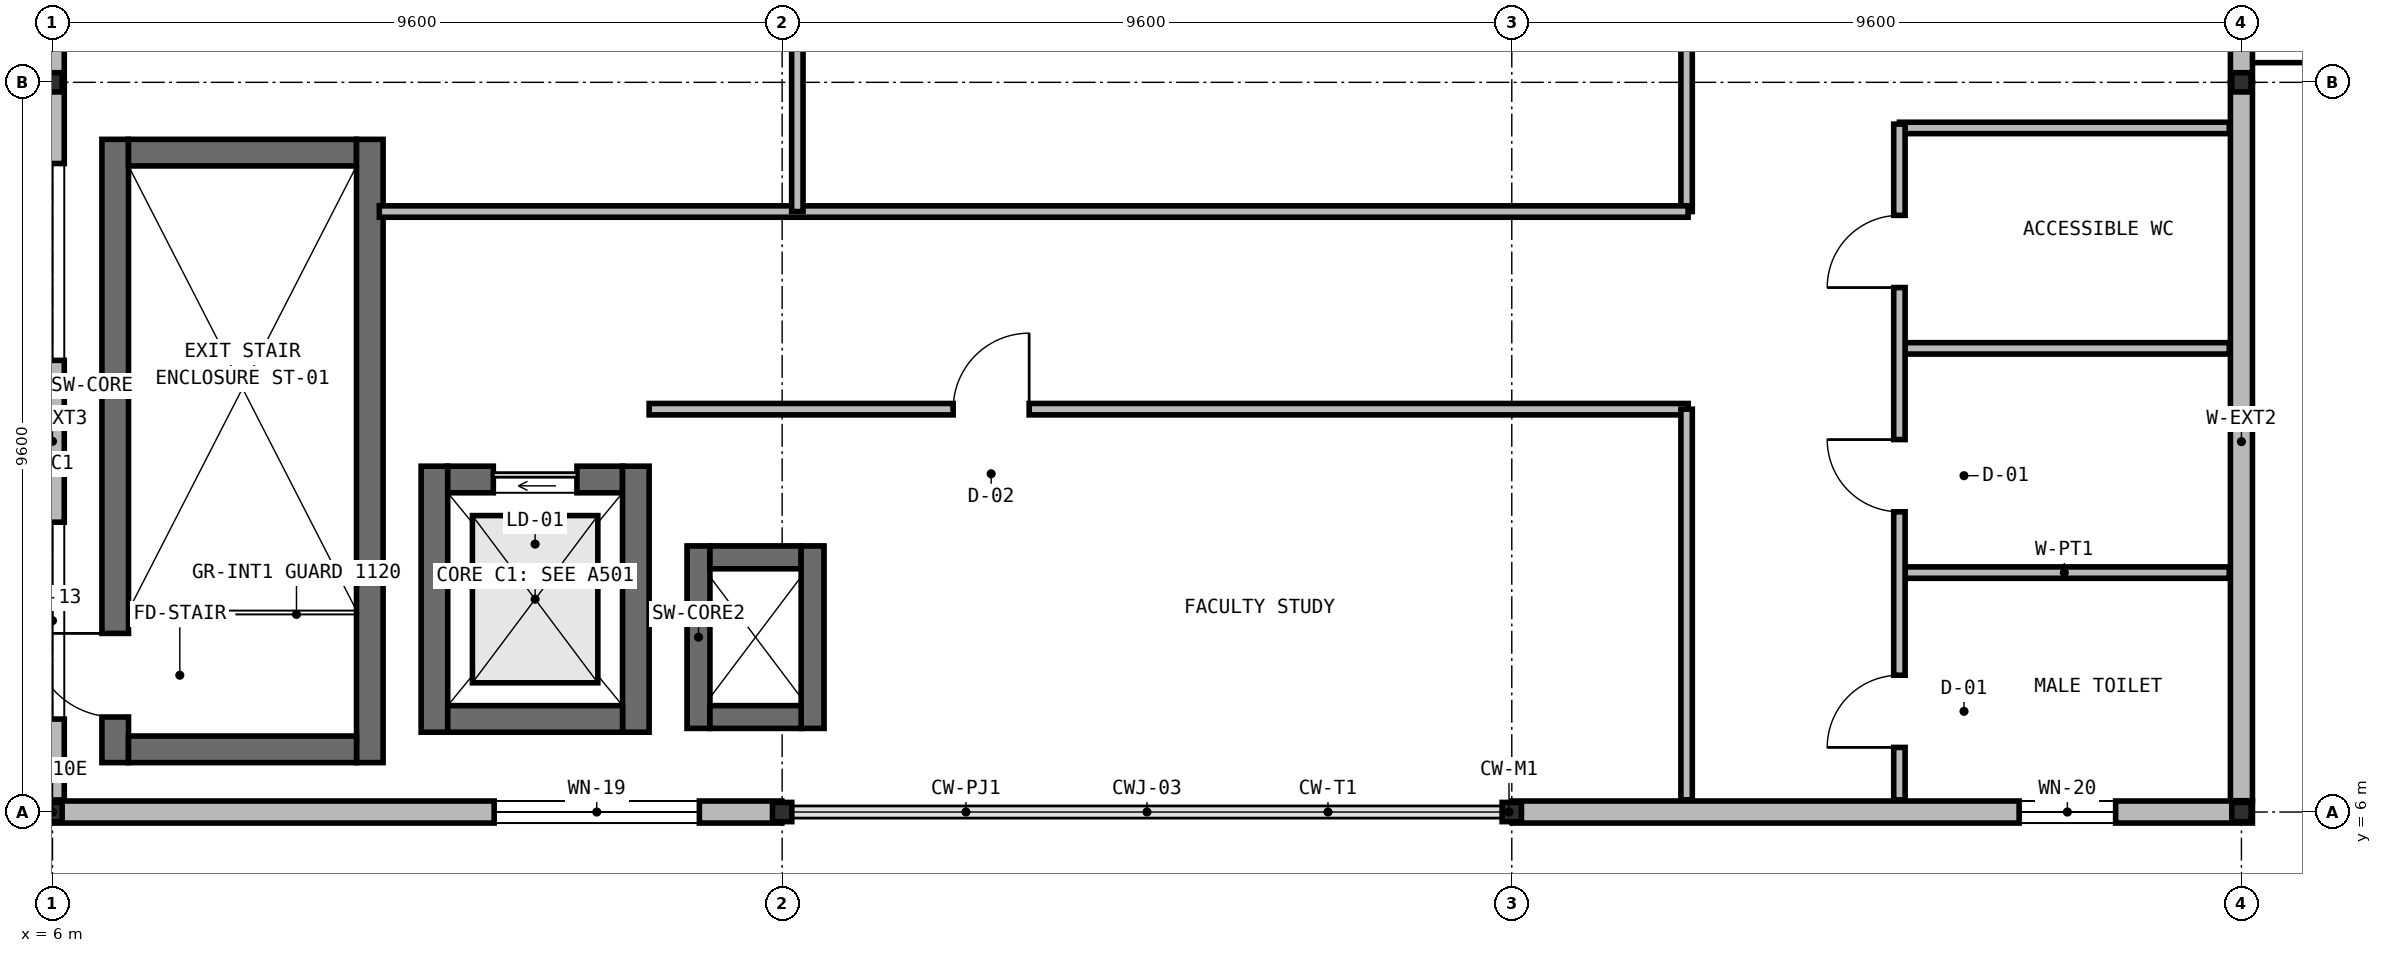
"""IFC4 building model, lengths in metres.
Left out: names, types, materials, properties, quantities, classifications, styles, units other than length and angle.
Written with IfcOpenShell. Run it as: python <this file> out.ifc"""

import sys

from ifc_helpers import new_model, si_unit, direction, frame, frame_2d, origin, origin_2d, place, context, subcontext, project, spatial, rectangle, i_section, extrude, element, fill, save


model = new_model("IFC4")
c1 = context("Model", 3, precision=1e-05, world=origin(), true_north=direction((0.0, 1.0)))
c2 = subcontext(c1, "Body", "Model", "MODEL_VIEW")
j1 = project(units=[si_unit("LENGTHUNIT", "METRE"), si_unit("PLANEANGLEUNIT", "RADIAN")], contexts=[c1])
p1 = place(None, origin())
s1 = spatial("IfcSite", under=j1, at=p1, CompositionType="ELEMENT")
p2 = place(p1, origin())
s2 = spatial("IfcBuilding", under=s1, at=p2, CompositionType="ELEMENT")
p3 = place(p2, frame((0.0, 0.0, 9.8)))
s3 = spatial("IfcBuildingStorey", under=s2, at=p3, CompositionType="ELEMENT", Elevation=9.8)
p4 = place(p3, frame((6.825, 6.65, 0.0), z_axis=(0.0, 0.0, 1.0), x_axis=(0.0, 1.0, 0.0)))
e1 = element("IfcWall", 1, at=p4, inside=s3, PredefinedType="SHEAR", context=c2, shape_type="SweptSolid", body=[
    extrude(rectangle(XDim=8.2, YDim=0.35, at=frame_2d((4.1, 0.0))), origin(), (0.0, 0.0, 1.0), 4.35),
])
p5 = place(p4, frame((0.6, 0.0, 0.0)))
e2 = element("IfcOpeningElement", 2, at=p5, cuts=e1, PredefinedType="OPENING", context=c2, shape_type="SweptSolid", body=[
    extrude(rectangle(XDim=1.1, YDim=2.15, at=frame_2d((0.55, 1.075))), frame((0.0, 0.185, 0.0), z_axis=(0.0, -1.0, 0.0), x_axis=(1.0, 0.0, 0.0)), (0.0, 0.0, 1.0), 0.37),
])
p6 = place(p3, frame((7.0, 14.675, 0.0), z_axis=(0.0, 0.0, 1.0), x_axis=(1.0, 0.0, 0.0)))
e3 = element("IfcWall", 3, at=p6, inside=s3, PredefinedType="SHEAR", context=c2, shape_type="SweptSolid", body=[
    extrude(rectangle(XDim=3.0, YDim=0.35, at=frame_2d((1.5, 0.0))), origin(), (0.0, 0.0, 1.0), 4.35),
])
p7 = place(p3, frame((10.175, 14.85, 0.0), z_axis=(0.0, 0.0, 1.0), x_axis=(0.0, -1.0, 0.0)))
e4 = element("IfcWall", 4, at=p7, inside=s3, PredefinedType="SHEAR", context=c2, shape_type="SweptSolid", body=[
    extrude(rectangle(XDim=8.2, YDim=0.35, at=frame_2d((4.1, 0.0))), origin(), (0.0, 0.0, 1.0), 4.35),
])
p8 = place(p3, frame((10.0, 6.825, 0.0), z_axis=(0.0, 0.0, 1.0), x_axis=(-1.0, 0.0, 0.0)))
e5 = element("IfcWall", 5, at=p8, inside=s3, PredefinedType="SHEAR", context=c2, shape_type="SweptSolid", body=[
    extrude(rectangle(XDim=3.0, YDim=0.35, at=frame_2d((1.5, 0.0))), origin(), (0.0, 0.0, 1.0), 4.35),
])
p9 = place(p3, frame((11.025, 7.05, 0.0), z_axis=(0.0, 0.0, 1.0), x_axis=(0.0, 1.0, 0.0)))
e6 = element("IfcWall", 6, at=p9, inside=s3, PredefinedType="SHEAR", context=c2, shape_type="SweptSolid", body=[
    extrude(rectangle(XDim=3.5, YDim=0.35, at=frame_2d((1.75, 0.0))), origin(), (0.0, 0.0, 1.0), 4.55),
])
p10 = place(p3, frame((11.2, 10.375, 0.0), z_axis=(0.0, 0.0, 1.0), x_axis=(1.0, 0.0, 0.0)))
e7 = element("IfcWall", 7, at=p10, inside=s3, PredefinedType="SHEAR", context=c2, shape_type="SweptSolid", body=[
    extrude(rectangle(XDim=2.3, YDim=0.35, at=frame_2d((1.15, 0.0))), origin(), (0.0, 0.0, 1.0), 4.55),
])
p11 = place(p10, frame((0.6, 0.0, 0.0)))
e8 = element("IfcOpeningElement", 8, at=p11, cuts=e7, PredefinedType="OPENING", context=c2, shape_type="SweptSolid", body=[
    extrude(rectangle(XDim=1.1, YDim=2.15, at=frame_2d((0.55, 1.075))), frame((0.0, 0.185, 0.0), z_axis=(0.0, -1.0, 0.0), x_axis=(1.0, 0.0, 0.0)), (0.0, 0.0, 1.0), 0.37),
])
p12 = place(p3, frame((13.675, 10.55, 0.0), z_axis=(0.0, 0.0, 1.0), x_axis=(0.0, -1.0, 0.0)))
e9 = element("IfcWall", 9, at=p12, inside=s3, PredefinedType="SHEAR", context=c2, shape_type="SweptSolid", body=[
    extrude(rectangle(XDim=3.5, YDim=0.35, at=frame_2d((1.75, 0.0))), origin(), (0.0, 0.0, 1.0), 4.55),
])
p13 = place(p3, frame((13.5, 7.225, 0.0), z_axis=(0.0, 0.0, 1.0), x_axis=(-1.0, 0.0, 0.0)))
e10 = element("IfcWall", 10, at=p13, inside=s3, PredefinedType="SHEAR", context=c2, shape_type="SweptSolid", body=[
    extrude(rectangle(XDim=2.3, YDim=0.35, at=frame_2d((1.15, 0.0))), origin(), (0.0, 0.0, 1.0), 4.55),
])
for number, where, z_axis, x_axis in (
    (11, (6.0, 6.0, 0.0), (0.0, 0.0, 1.0), (1.0, 0.0, 0.0)),
    (12, (6.0, 15.6, 0.0), (0.0, 0.0, 1.0), (1.0, 0.0, 0.0)),
    (13, (15.6, 6.0, 0.0), (0.0, 0.0, 1.0), (1.0, 0.0, 0.0)),
    (14, (25.2, 6.0, 0.0), (0.0, 0.0, 1.0), (1.0, 0.0, 0.0)),
    (15, (34.8, 6.0, 0.0), (0.0, 0.0, 1.0), (1.0, 0.0, 0.0)),
    (16, (34.8, 15.6, 0.0), (0.0, 0.0, 1.0), (1.0, 0.0, 0.0)),
):
    element("IfcColumn", number, at=place(p3, frame(where, z_axis=z_axis, x_axis=x_axis)), inside=s3, PredefinedType="COLUMN", context=c2, shape_type="SweptSolid", body=[
        extrude(i_section(OverallWidth=0.254, OverallDepth=0.253, WebThickness=0.009, FlangeThickness=0.014, at=origin_2d()), origin(), (0.0, 0.0, 1.0), 4.55),
    ])
p14 = place(p3, frame((14.5, 7.1, 0.0), z_axis=(0.0, 0.0, 1.0), x_axis=(0.0, 1.0, 0.0)))
e17 = element("IfcWall", 17, at=p14, inside=s3, PredefinedType="SHEAR", context=c2, shape_type="SweptSolid", body=[
    extrude(rectangle(XDim=2.4, YDim=0.3, at=frame_2d((1.2, 0.0))), origin(), (0.0, 0.0, 1.0), 4.37),
])
p15 = place(p3, frame((14.65, 9.35, 0.0), z_axis=(0.0, 0.0, 1.0), x_axis=(1.0, 0.0, 0.0)))
e18 = element("IfcWall", 18, at=p15, inside=s3, PredefinedType="SHEAR", context=c2, shape_type="SweptSolid", body=[
    extrude(rectangle(XDim=1.2, YDim=0.3, at=frame_2d((0.6, 0.0))), origin(), (0.0, 0.0, 1.0), 4.37),
])
p16 = place(p3, frame((16.0, 9.5, 0.0), z_axis=(0.0, 0.0, 1.0), x_axis=(0.0, -1.0, 0.0)))
e19 = element("IfcWall", 19, at=p16, inside=s3, PredefinedType="SHEAR", context=c2, shape_type="SweptSolid", body=[
    extrude(rectangle(XDim=2.4, YDim=0.3, at=frame_2d((1.2, 0.0))), origin(), (0.0, 0.0, 1.0), 4.37),
])
p17 = place(p3, frame((15.85, 7.25, 0.0), z_axis=(0.0, 0.0, 1.0), x_axis=(-1.0, 0.0, 0.0)))
e20 = element("IfcWall", 20, at=p17, inside=s3, PredefinedType="SHEAR", context=c2, shape_type="SweptSolid", body=[
    extrude(rectangle(XDim=1.2, YDim=0.3, at=frame_2d((0.6, 0.0))), origin(), (0.0, 0.0, 1.0), 4.37),
])
p18 = place(p3, frame((6.0, 6.159, 0.0), z_axis=(0.0, 0.0, 1.0), x_axis=(0.0, 1.0, 0.0)))
e21 = element("IfcWall", 21, at=p18, inside=s3, PredefinedType="SOLIDWALL", context=c2, shape_type="SweptSolid", body=[
    extrude(rectangle(XDim=9.437, YDim=0.31, at=frame_2d((4.719, 0.0))), origin(), (0.0, 0.0, 1.0), 4.064),
])
p19 = place(p18, frame((1.064, 0.0, 0.95)))
e22 = element("IfcOpeningElement", 22, at=p19, cuts=e21, PredefinedType="OPENING", context=c2, shape_type="SweptSolid", body=[
    extrude(rectangle(XDim=2.59, YDim=1.8, at=frame_2d((1.295, 0.9))), frame((0.0, 0.165, 0.0), z_axis=(0.0, -1.0, 0.0), x_axis=(1.0, 0.0, 0.0)), (0.0, 0.0, 1.0), 0.33),
])
p20 = place(p18, frame((5.783, 0.0, 0.95)))
e23 = element("IfcOpeningElement", 23, at=p20, cuts=e21, PredefinedType="OPENING", context=c2, shape_type="SweptSolid", body=[
    extrude(rectangle(XDim=2.59, YDim=1.8, at=frame_2d((1.295, 0.9))), frame((0.0, 0.165, 0.0), z_axis=(0.0, -1.0, 0.0), x_axis=(1.0, 0.0, 0.0)), (0.0, 0.0, 1.0), 0.33),
])
p21 = place(p3, frame((6.0, 15.604, 0.0), z_axis=(0.0, 0.0, 1.0), x_axis=(0.0, 1.0, 0.0)))
e24 = element("IfcWall", 24, at=p21, inside=s3, PredefinedType="SOLIDWALL", context=c2, shape_type="SweptSolid", body=[
    extrude(rectangle(XDim=9.592, YDim=0.31, at=frame_2d((4.796, 0.0))), origin(), (0.0, 0.0, 1.0), 4.064),
])
p22 = place(p3, frame((34.8, 15.596, 0.0), z_axis=(0.0, 0.0, 1.0), x_axis=(0.0, -1.0, 0.0)))
e25 = element("IfcWall", 25, at=p22, inside=s3, PredefinedType="SOLIDWALL", context=c2, shape_type="SweptSolid", body=[
    extrude(rectangle(XDim=9.447, YDim=0.29, at=frame_2d((4.724, 0.0))), origin(), (0.0, 0.0, 1.0), 4.064),
])
p23 = place(p3, frame((34.8, 25.196, 0.0), z_axis=(0.0, 0.0, 1.0), x_axis=(0.0, -1.0, 0.0)))
e26 = element("IfcWall", 26, at=p23, inside=s3, PredefinedType="SOLIDWALL", context=c2, shape_type="SweptSolid", body=[
    extrude(rectangle(XDim=9.592, YDim=0.29, at=frame_2d((4.796, 0.0))), origin(), (0.0, 0.0, 1.0), 4.064),
])
p24 = place(p23, frame((1.708, 0.0, 0.95)))
e27 = element("IfcOpeningElement", 27, at=p24, cuts=e26, PredefinedType="OPENING", context=c2, shape_type="SweptSolid", body=[
    extrude(rectangle(XDim=1.38, YDim=1.72, at=frame_2d((0.69, 0.86))), frame((0.0, 0.155, 0.0), z_axis=(0.0, -1.0, 0.0), x_axis=(1.0, 0.0, 0.0)), (0.0, 0.0, 1.0), 0.31),
])
p25 = place(p23, frame((6.504, 0.0, 0.95)))
e28 = element("IfcOpeningElement", 28, at=p25, cuts=e26, PredefinedType="OPENING", context=c2, shape_type="SweptSolid", body=[
    extrude(rectangle(XDim=1.38, YDim=1.72, at=frame_2d((0.69, 0.86))), frame((0.0, 0.155, 0.0), z_axis=(0.0, -1.0, 0.0), x_axis=(1.0, 0.0, 0.0)), (0.0, 0.0, 1.0), 0.31),
])
p26 = place(p3, frame((15.596, 6.0, 0.0), z_axis=(0.0, 0.0, 1.0), x_axis=(-1.0, 0.0, 0.0)))
e29 = element("IfcWall", 29, at=p26, inside=s3, PredefinedType="SOLIDWALL", context=c2, shape_type="SweptSolid", body=[
    extrude(rectangle(XDim=9.741, YDim=0.29, at=frame_2d((4.871, 0.0))), origin(), (0.0, 0.0, 1.0), 4.064),
])
p27 = place(p26, frame((1.085, 0.0, 0.95)))
e30 = element("IfcOpeningElement", 30, at=p27, cuts=e29, PredefinedType="OPENING", context=c2, shape_type="SweptSolid", body=[
    extrude(rectangle(XDim=2.7, YDim=1.4, at=frame_2d((1.35, 0.7))), frame((0.0, 0.155, 0.0), z_axis=(0.0, -1.0, 0.0), x_axis=(1.0, 0.0, 0.0)), (0.0, 0.0, 1.0), 0.31),
])
p28 = place(p3, frame((34.945, 6.0, 0.0), z_axis=(0.0, 0.0, 1.0), x_axis=(-1.0, 0.0, 0.0)))
e31 = element("IfcWall", 31, at=p28, inside=s3, PredefinedType="SOLIDWALL", context=c2, shape_type="SweptSolid", body=[
    extrude(rectangle(XDim=9.741, YDim=0.29, at=frame_2d((4.871, 0.0))), origin(), (0.0, 0.0, 1.0), 4.064),
])
p29 = place(p28, frame((1.8, 0.0, 0.95)))
e32 = element("IfcOpeningElement", 32, at=p29, cuts=e31, PredefinedType="OPENING", context=c2, shape_type="SweptSolid", body=[
    extrude(rectangle(XDim=1.27, YDim=1.8, at=frame_2d((0.635, 0.9))), frame((0.0, 0.155, 0.0), z_axis=(0.0, -1.0, 0.0), x_axis=(1.0, 0.0, 0.0)), (0.0, 0.0, 1.0), 0.31),
])
for number, where, z_axis, x_axis in (
    (33, (30.3, 9.15, 0.0), (0.0, 0.0, 1.0), (1.0, 0.0, 0.0)),
    (34, (30.3, 12.1, 0.0), (0.0, 0.0, 1.0), (1.0, 0.0, 0.0)),
    (35, (30.3, 15.0, 0.0), (0.0, 0.0, 1.0), (1.0, 0.0, 0.0)),
):
    element("IfcWall", number, at=place(p3, frame(where, z_axis=z_axis, x_axis=x_axis)), inside=s3, PredefinedType="PARTITIONING", context=c2, shape_type="SweptSolid", body=[
        extrude(rectangle(XDim=4.34, YDim=0.15, at=frame_2d((2.17, 0.0))), origin(), (0.0, 0.0, 1.0), 4.3),
    ])
p30 = place(p3, frame((30.3, 6.16, 0.0), z_axis=(0.0, 0.0, 1.0), x_axis=(0.0, 1.0, 0.0)))
e36 = element("IfcWall", 36, at=p30, inside=s3, PredefinedType="PARTITIONING", context=c2, shape_type="SweptSolid", body=[
    extrude(rectangle(XDim=8.89, YDim=0.15, at=frame_2d((4.445, 0.0))), origin(), (0.0, 0.0, 1.0), 4.3),
])
p31 = place(p30, frame((0.69, 0.0, 0.0)))
e37 = element("IfcOpeningElement", 37, at=p31, cuts=e36, PredefinedType="OPENING", context=c2, shape_type="SweptSolid", body=[
    extrude(rectangle(XDim=0.95, YDim=2.1, at=frame_2d((0.475, 1.05))), frame((0.0, 0.085, 0.0), z_axis=(0.0, -1.0, 0.0), x_axis=(1.0, 0.0, 0.0)), (0.0, 0.0, 1.0), 0.17),
])
p32 = place(p30, frame((3.79, 0.0, 0.0)))
e38 = element("IfcOpeningElement", 38, at=p32, cuts=e36, PredefinedType="OPENING", context=c2, shape_type="SweptSolid", body=[
    extrude(rectangle(XDim=0.95, YDim=2.1, at=frame_2d((0.475, 1.05))), frame((0.0, 0.085, 0.0), z_axis=(0.0, -1.0, 0.0), x_axis=(1.0, 0.0, 0.0)), (0.0, 0.0, 1.0), 0.17),
])
p33 = place(p30, frame((6.74, 0.0, 0.0)))
e39 = element("IfcOpeningElement", 39, at=p33, cuts=e36, PredefinedType="OPENING", context=c2, shape_type="SweptSolid", body=[
    extrude(rectangle(XDim=0.95, YDim=2.1, at=frame_2d((0.475, 1.05))), frame((0.0, 0.085, 0.0), z_axis=(0.0, -1.0, 0.0), x_axis=(1.0, 0.0, 0.0)), (0.0, 0.0, 1.0), 0.17),
])
p34 = place(p3, frame((27.5, 13.9, 0.0), z_axis=(0.0, 0.0, 1.0), x_axis=(0.0, 1.0, 0.0)))
e40 = element("IfcWall", 40, at=p34, inside=s3, PredefinedType="PARTITIONING", context=c2, shape_type="SweptSolid", body=[
    extrude(rectangle(XDim=20.74, YDim=0.15, at=frame_2d((10.37, 0.0))), origin(), (0.0, 0.0, 1.0), 4.3),
])
p35 = place(p34, frame((3.2, 0.0, 0.0)))
e41 = element("IfcOpeningElement", 41, at=p35, cuts=e40, PredefinedType="OPENING", context=c2, shape_type="SweptSolid", body=[
    extrude(rectangle(XDim=1.2, YDim=2.2, at=frame_2d((0.6, 1.1))), frame((0.0, 0.085, 0.0), z_axis=(0.0, -1.0, 0.0), x_axis=(1.0, 0.0, 0.0)), (0.0, 0.0, 1.0), 0.17),
])
p36 = place(p34, frame((14.8, 0.0, 0.0)))
e42 = element("IfcOpeningElement", 42, at=p36, cuts=e40, PredefinedType="OPENING", context=c2, shape_type="SweptSolid", body=[
    extrude(rectangle(XDim=1.1, YDim=2.2, at=frame_2d((0.55, 1.1))), frame((0.0, 0.085, 0.0), z_axis=(0.0, -1.0, 0.0), x_axis=(1.0, 0.0, 0.0)), (0.0, 0.0, 1.0), 0.17),
])
p37 = place(p3, frame((13.85, 11.3, 0.0), z_axis=(0.0, 0.0, 1.0), x_axis=(1.0, 0.0, 0.0)))
e43 = element("IfcWall", 43, at=p37, inside=s3, PredefinedType="PARTITIONING", context=c2, shape_type="SweptSolid", body=[
    extrude(rectangle(XDim=13.67, YDim=0.15, at=frame_2d((6.835, 0.0))), origin(), (0.0, 0.0, 1.0), 4.3),
])
p38 = place(p37, frame((4.0, 0.0, 0.0)))
e44 = element("IfcOpeningElement", 44, at=p38, cuts=e43, PredefinedType="OPENING", context=c2, shape_type="SweptSolid", body=[
    extrude(rectangle(XDim=1.0, YDim=2.2, at=frame_2d((0.5, 1.1))), frame((0.0, 0.085, 0.0), z_axis=(0.0, -1.0, 0.0), x_axis=(1.0, 0.0, 0.0)), (0.0, 0.0, 1.0), 0.17),
])
p39 = place(p3, frame((27.5, 6.16, 0.0), z_axis=(0.0, 0.0, 1.0), x_axis=(0.0, 1.0, 0.0)))
e45 = element("IfcWall", 45, at=p39, inside=s3, PredefinedType="PARTITIONING", context=c2, shape_type="SweptSolid", body=[
    extrude(rectangle(XDim=5.14, YDim=0.15, at=frame_2d((2.57, 0.0))), origin(), (0.0, 0.0, 1.0), 4.3),
])
p40 = place(p3, frame((10.3, 13.9, 0.0), z_axis=(0.0, 0.0, 1.0), x_axis=(1.0, 0.0, 0.0)))
e46 = element("IfcWall", 46, at=p40, inside=s3, PredefinedType="PARTITIONING", context=c2, shape_type="SweptSolid", body=[
    extrude(rectangle(XDim=17.22, YDim=0.15, at=frame_2d((8.61, 0.0))), origin(), (0.0, 0.0, 1.0), 4.3),
])
p41 = place(p3, frame((15.8, 13.9, 0.0), z_axis=(0.0, 0.0, 1.0), x_axis=(0.0, 1.0, 0.0)))
e47 = element("IfcWall", 47, at=p41, inside=s3, PredefinedType="PARTITIONING", context=c2, shape_type="SweptSolid", body=[
    extrude(rectangle(XDim=20.74, YDim=0.15, at=frame_2d((10.37, 0.0))), origin(), (0.0, 0.0, 1.0), 4.3),
])
p42 = place(p41, frame((3.0, 0.0, 0.0)))
e48 = element("IfcOpeningElement", 48, at=p42, cuts=e47, PredefinedType="OPENING", context=c2, shape_type="SweptSolid", body=[
    extrude(rectangle(XDim=1.1, YDim=2.2, at=frame_2d((0.55, 1.1))), frame((0.0, 0.085, 0.0), z_axis=(0.0, -1.0, 0.0), x_axis=(1.0, 0.0, 0.0)), (0.0, 0.0, 1.0), 0.17),
])
p43 = place(p41, frame((10.8, 0.0, 0.0)))
e49 = element("IfcOpeningElement", 49, at=p43, cuts=e47, PredefinedType="OPENING", context=c2, shape_type="SweptSolid", body=[
    extrude(rectangle(XDim=1.0, YDim=2.2, at=frame_2d((0.5, 1.1))), frame((0.0, 0.085, 0.0), z_axis=(0.0, -1.0, 0.0), x_axis=(1.0, 0.0, 0.0)), (0.0, 0.0, 1.0), 0.17),
])
p44 = place(p19, origin())
e50 = element("IfcWindow", 50, at=p44, inside=s3, PartitioningType="SINGLE_PANEL", PredefinedType="WINDOW", context=c2, shape_type="SweptSolid", body=[
    extrude(rectangle(XDim=2.59, YDim=1.8, at=frame_2d((1.295, 0.9))), frame((0.0, 0.03, 0.0), z_axis=(0.0, -1.0, 0.0), x_axis=(1.0, 0.0, 0.0)), (0.0, 0.0, 1.0), 0.06),
])
fill(e22, e50)
p45 = place(p20, origin())
e51 = element("IfcWindow", 51, at=p45, inside=s3, PartitioningType="SINGLE_PANEL", PredefinedType="WINDOW", context=c2, shape_type="SweptSolid", body=[
    extrude(rectangle(XDim=2.59, YDim=1.8, at=frame_2d((1.295, 0.9))), frame((0.0, 0.03, 0.0), z_axis=(0.0, -1.0, 0.0), x_axis=(1.0, 0.0, 0.0)), (0.0, 0.0, 1.0), 0.06),
])
fill(e23, e51)
p46 = place(p27, origin())
e52 = element("IfcWindow", 52, at=p46, inside=s3, PartitioningType="SINGLE_PANEL", PredefinedType="WINDOW", context=c2, shape_type="SweptSolid", body=[
    extrude(rectangle(XDim=2.7, YDim=1.4, at=frame_2d((1.35, 0.7))), frame((0.0, 0.03, 0.0), z_axis=(0.0, -1.0, 0.0), x_axis=(1.0, 0.0, 0.0)), (0.0, 0.0, 1.0), 0.06),
])
fill(e30, e52)
p47 = place(p29, origin())
e53 = element("IfcWindow", 53, at=p47, inside=s3, PartitioningType="SINGLE_PANEL", PredefinedType="WINDOW", context=c2, shape_type="SweptSolid", body=[
    extrude(rectangle(XDim=1.27, YDim=1.8, at=frame_2d((0.635, 0.9))), frame((0.0, 0.03, 0.0), z_axis=(0.0, -1.0, 0.0), x_axis=(1.0, 0.0, 0.0)), (0.0, 0.0, 1.0), 0.06),
])
fill(e32, e53)
p48 = place(p5, origin())
e54 = element("IfcDoor", 54, at=p48, inside=s3, OperationType="SINGLE_SWING_RIGHT", PredefinedType="DOOR", context=c2, shape_type="SweptSolid", body=[
    extrude(rectangle(XDim=1.1, YDim=2.15, at=frame_2d((0.55, 1.075))), frame((0.0, 0.025, 0.0), z_axis=(0.0, -1.0, 0.0), x_axis=(1.0, 0.0, 0.0)), (0.0, 0.0, 1.0), 0.05),
])
fill(e2, e54)
p49 = place(p11, origin())
e55 = element("IfcDoor", 55, at=p49, inside=s3, OperationType="SLIDING_TO_LEFT", PredefinedType="USERDEFINED", context=c2, shape_type="SweptSolid", body=[
    extrude(rectangle(XDim=1.1, YDim=2.15, at=frame_2d((0.55, 1.075))), frame((0.0, 0.025, 0.0), z_axis=(0.0, -1.0, 0.0), x_axis=(1.0, 0.0, 0.0)), (0.0, 0.0, 1.0), 0.05),
])
fill(e8, e55)
p50 = place(p31, origin())
e56 = element("IfcDoor", 56, at=p50, inside=s3, OperationType="SINGLE_SWING_LEFT", PredefinedType="DOOR", context=c2, shape_type="SweptSolid", body=[
    extrude(rectangle(XDim=0.95, YDim=2.1, at=frame_2d((0.475, 1.05))), frame((0.0, 0.025, 0.0), z_axis=(0.0, -1.0, 0.0), x_axis=(1.0, 0.0, 0.0)), (0.0, 0.0, 1.0), 0.05),
])
fill(e37, e56)
p51 = place(p32, origin())
e57 = element("IfcDoor", 57, at=p51, inside=s3, OperationType="SINGLE_SWING_RIGHT", PredefinedType="DOOR", context=c2, shape_type="SweptSolid", body=[
    extrude(rectangle(XDim=0.95, YDim=2.1, at=frame_2d((0.475, 1.05))), frame((0.0, 0.025, 0.0), z_axis=(0.0, -1.0, 0.0), x_axis=(1.0, 0.0, 0.0)), (0.0, 0.0, 1.0), 0.05),
])
fill(e38, e57)
p52 = place(p33, origin())
e58 = element("IfcDoor", 58, at=p52, inside=s3, OperationType="SINGLE_SWING_LEFT", PredefinedType="DOOR", context=c2, shape_type="SweptSolid", body=[
    extrude(rectangle(XDim=0.95, YDim=2.1, at=frame_2d((0.475, 1.05))), frame((0.0, 0.025, 0.0), z_axis=(0.0, -1.0, 0.0), x_axis=(1.0, 0.0, 0.0)), (0.0, 0.0, 1.0), 0.05),
])
fill(e39, e58)
p53 = place(p38, origin())
e59 = element("IfcDoor", 59, at=p53, inside=s3, OperationType="SINGLE_SWING_RIGHT", PredefinedType="DOOR", context=c2, shape_type="SweptSolid", body=[
    extrude(rectangle(XDim=1.0, YDim=2.2, at=frame_2d((0.5, 1.1))), frame((0.0, 0.025, 0.0), z_axis=(0.0, -1.0, 0.0), x_axis=(1.0, 0.0, 0.0)), (0.0, 0.0, 1.0), 0.05),
])
fill(e44, e59)
save(model, sys.argv[1])
